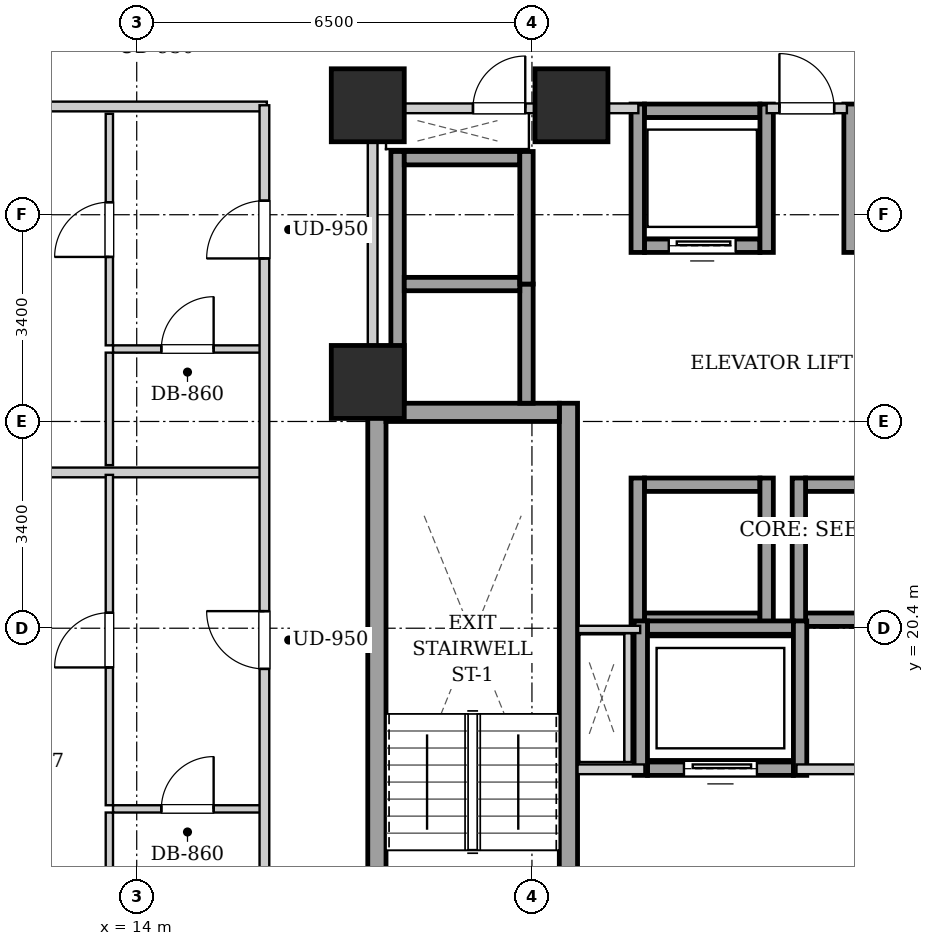
"""IFC4 building model, lengths in metres.
Left out: names, types, materials, properties, quantities, classifications, styles, units other than length and angle.
Written with IfcOpenShell. Run it as: python <this file> out.ifc"""

import sys

from ifc_helpers import new_model, si_unit, direction, frame, frame_2d, origin, origin_2d, place, context, subcontext, project, spatial, rectangle, extrude, element, fill, save


model = new_model("IFC4")
c1 = context("Model", 3, precision=1e-05, world=origin(), true_north=direction((0.0, 1.0)))
c2 = subcontext(c1, "Body", "Model", "MODEL_VIEW")
j1 = project(units=[si_unit("LENGTHUNIT", "METRE"), si_unit("PLANEANGLEUNIT", "RADIAN")], contexts=[c1])
p1 = place(None, origin())
s1 = spatial("IfcSite", under=j1, at=p1, CompositionType="ELEMENT")
p2 = place(p1, origin())
s2 = spatial("IfcBuilding", under=s1, at=p2, CompositionType="ELEMENT")
p3 = place(p2, frame((0.0, 0.0, 61.0)))
s3 = spatial("IfcBuildingStorey", under=s2, at=p3, CompositionType="ELEMENT", Elevation=61.0)
for number, where, z_axis, x_axis in (
    (1, (17.8, 29.0, 0.0), (0.0, 0.0, 1.0), (1.0, 0.0, 0.0)),
    (2, (21.15, 29.0, 0.0), (0.0, 0.0, 1.0), (1.0, 0.0, 0.0)),
    (3, (17.8, 24.45, 0.0), (0.0, 0.0, 1.0), (1.0, 0.0, 0.0)),
):
    element("IfcColumn", number, at=place(p3, frame(where, z_axis=z_axis, x_axis=x_axis)), inside=s3, PredefinedType="COLUMN", context=c2, shape_type="SweptSolid", body=[
        extrude(rectangle(XDim=1.2, YDim=1.2, at=origin_2d()), origin(), (0.0, 0.0, 1.0), 3.2),
    ])
for number, where, z_axis, x_axis in (
    (4, (17.95, 15.1, 0.0), (0.0, 0.0, 1.0), (0.0, 1.0, 0.0)),
    (5, (21.1, 15.1, 0.0), (0.0, 0.0, 1.0), (0.0, 1.0, 0.0)),
):
    element("IfcWall", number, at=place(p3, frame(where, z_axis=z_axis, x_axis=x_axis)), inside=s3, PredefinedType="SHEAR", context=c2, shape_type="SweptSolid", body=[
        extrude(rectangle(XDim=9.0, YDim=0.3, at=frame_2d((4.5, 0.0))), origin(), (0.0, 0.0, 1.0), 2.94),
    ])
p4 = place(p3, frame((18.1, 23.95, 0.0), z_axis=(0.0, 0.0, 1.0), x_axis=(1.0, 0.0, 0.0)))
e6 = element("IfcWall", 6, at=p4, inside=s3, PredefinedType="SHEAR", context=c2, shape_type="SweptSolid", body=[
    extrude(rectangle(XDim=2.85, YDim=0.3, at=frame_2d((1.425, 0.0))), origin(), (0.0, 0.0, 1.0), 2.94),
])
p5 = place(p3, frame((22.35, 26.69, 0.0), z_axis=(0.0, 0.0, 1.0), x_axis=(1.0, 0.0, 0.0)))
e7 = element("IfcWall", 7, at=p5, inside=s3, PredefinedType="SHEAR", context=c2, shape_type="SweptSolid", body=[
    extrude(rectangle(XDim=1.9, YDim=0.22, at=frame_2d((0.95, 0.0))), origin(), (0.0, 0.0, 1.0), 2.94),
])
p6 = place(p5, frame((0.4, 0.0, 0.0)))
e8 = element("IfcOpeningElement", 8, at=p6, cuts=e7, PredefinedType="OPENING", context=c2, shape_type="SweptSolid", body=[
    extrude(rectangle(XDim=1.1, YDim=2.15, at=frame_2d((0.55, 1.075))), frame((0.0, 0.12, 0.0), z_axis=(0.0, -1.0, 0.0), x_axis=(1.0, 0.0, 0.0)), (0.0, 0.0, 1.0), 0.24),
])
p7 = place(p3, frame((22.35, 28.91, 0.0), z_axis=(0.0, 0.0, 1.0), x_axis=(1.0, 0.0, 0.0)))
e9 = element("IfcWall", 9, at=p7, inside=s3, PredefinedType="SHEAR", context=c2, shape_type="SweptSolid", body=[
    extrude(rectangle(XDim=1.9, YDim=0.22, at=frame_2d((0.95, 0.0))), origin(), (0.0, 0.0, 1.0), 2.94),
])
for number, where, z_axis, x_axis in (
    (10, (22.24, 26.58, 0.0), (0.0, 0.0, 1.0), (0.0, 1.0, 0.0)),
    (11, (24.36, 26.58, 0.0), (0.0, 0.0, 1.0), (0.0, 1.0, 0.0)),
    (12, (25.74, 26.58, 0.0), (0.0, 0.0, 1.0), (0.0, 1.0, 0.0)),
):
    element("IfcWall", number, at=place(p3, frame(where, z_axis=z_axis, x_axis=x_axis)), inside=s3, PredefinedType="SHEAR", context=c2, shape_type="SweptSolid", body=[
        extrude(rectangle(XDim=2.44, YDim=0.22, at=frame_2d((1.22, 0.0))), origin(), (0.0, 0.0, 1.0), 2.94),
    ])
for number, where, z_axis, x_axis in (
    (13, (22.35, 20.54, 0.0), (0.0, 0.0, 1.0), (1.0, 0.0, 0.0)),
    (14, (22.35, 22.76, 0.0), (0.0, 0.0, 1.0), (1.0, 0.0, 0.0)),
):
    element("IfcWall", number, at=place(p3, frame(where, z_axis=z_axis, x_axis=x_axis)), inside=s3, PredefinedType="SHEAR", context=c2, shape_type="SweptSolid", body=[
        extrude(rectangle(XDim=1.9, YDim=0.22, at=frame_2d((0.95, 0.0))), origin(), (0.0, 0.0, 1.0), 2.94),
    ])
for number, where, z_axis, x_axis in (
    (15, (22.24, 20.43, 0.0), (0.0, 0.0, 1.0), (0.0, 1.0, 0.0)),
    (16, (24.36, 20.43, 0.0), (0.0, 0.0, 1.0), (0.0, 1.0, 0.0)),
):
    element("IfcWall", number, at=place(p3, frame(where, z_axis=z_axis, x_axis=x_axis)), inside=s3, PredefinedType="SHEAR", context=c2, shape_type="SweptSolid", body=[
        extrude(rectangle(XDim=2.44, YDim=0.22, at=frame_2d((1.22, 0.0))), origin(), (0.0, 0.0, 1.0), 2.94),
    ])
for number, where, z_axis, x_axis in (
    (17, (25.0, 20.54, 0.0), (0.0, 0.0, 1.0), (1.0, 0.0, 0.0)),
    (18, (25.0, 22.76, 0.0), (0.0, 0.0, 1.0), (1.0, 0.0, 0.0)),
):
    element("IfcWall", number, at=place(p3, frame(where, z_axis=z_axis, x_axis=x_axis)), inside=s3, PredefinedType="SHEAR", context=c2, shape_type="SweptSolid", body=[
        extrude(rectangle(XDim=1.9, YDim=0.22, at=frame_2d((0.95, 0.0))), origin(), (0.0, 0.0, 1.0), 2.94),
    ])
p8 = place(p3, frame((24.89, 20.43, 0.0), z_axis=(0.0, 0.0, 1.0), x_axis=(0.0, 1.0, 0.0)))
e19 = element("IfcWall", 19, at=p8, inside=s3, PredefinedType="SHEAR", context=c2, shape_type="SweptSolid", body=[
    extrude(rectangle(XDim=2.44, YDim=0.22, at=frame_2d((1.22, 0.0))), origin(), (0.0, 0.0, 1.0), 2.94),
])
p9 = place(p3, frame((18.29, 24.1, 0.0), z_axis=(0.0, 0.0, 1.0), x_axis=(0.0, 1.0, 0.0)))
e20 = element("IfcWall", 20, at=p9, inside=s3, PredefinedType="SHEAR", context=c2, shape_type="SweptSolid", body=[
    extrude(rectangle(XDim=4.14, YDim=0.22, at=frame_2d((2.07, 0.0))), origin(), (0.0, 0.0, 1.0), 2.94),
])
p10 = place(p3, frame((20.41, 24.1, 0.0), z_axis=(0.0, 0.0, 1.0), x_axis=(0.0, 1.0, 0.0)))
e21 = element("IfcWall", 21, at=p10, inside=s3, PredefinedType="SHEAR", context=c2, shape_type="SweptSolid", body=[
    extrude(rectangle(XDim=1.96, YDim=0.22, at=frame_2d((0.98, 0.0))), origin(), (0.0, 0.0, 1.0), 2.94),
])
for number, where, z_axis, x_axis in (
    (22, (18.4, 26.06, 0.0), (0.0, 0.0, 1.0), (1.0, 0.0, 0.0)),
    (23, (18.4, 28.13, 0.0), (0.0, 0.0, 1.0), (1.0, 0.0, 0.0)),
):
    element("IfcWall", number, at=place(p3, frame(where, z_axis=z_axis, x_axis=x_axis)), inside=s3, PredefinedType="SHEAR", context=c2, shape_type="SweptSolid", body=[
        extrude(rectangle(XDim=1.9, YDim=0.22, at=frame_2d((0.95, 0.0))), origin(), (0.0, 0.0, 1.0), 2.94),
    ])
p11 = place(p3, frame((20.41, 26.06, 0.0), z_axis=(0.0, 0.0, 1.0), x_axis=(0.0, 1.0, 0.0)))
e24 = element("IfcWall", 24, at=p11, inside=s3, PredefinedType="SHEAR", context=c2, shape_type="SweptSolid", body=[
    extrude(rectangle(XDim=2.18, YDim=0.22, at=frame_2d((1.09, 0.0))), origin(), (0.0, 0.0, 1.0), 2.94),
])
p12 = place(p3, frame((22.4, 18.09, 0.0), z_axis=(0.0, 0.0, 1.0), x_axis=(1.0, 0.0, 0.0)))
e25 = element("IfcWall", 25, at=p12, inside=s3, PredefinedType="SHEAR", context=c2, shape_type="SweptSolid", body=[
    extrude(rectangle(XDim=2.4, YDim=0.22, at=frame_2d((1.2, 0.0))), origin(), (0.0, 0.0, 1.0), 2.94),
])
p13 = place(p12, frame((0.6, 0.0, 0.0)))
e26 = element("IfcOpeningElement", 26, at=p13, cuts=e25, PredefinedType="OPENING", context=c2, shape_type="SweptSolid", body=[
    extrude(rectangle(XDim=1.2, YDim=2.15, at=frame_2d((0.6, 1.075))), frame((0.0, 0.12, 0.0), z_axis=(0.0, -1.0, 0.0), x_axis=(1.0, 0.0, 0.0)), (0.0, 0.0, 1.0), 0.24),
])
p14 = place(p3, frame((22.4, 20.41, 0.0), z_axis=(0.0, 0.0, 1.0), x_axis=(1.0, 0.0, 0.0)))
e27 = element("IfcWall", 27, at=p14, inside=s3, PredefinedType="SHEAR", context=c2, shape_type="SweptSolid", body=[
    extrude(rectangle(XDim=2.4, YDim=0.22, at=frame_2d((1.2, 0.0))), origin(), (0.0, 0.0, 1.0), 2.94),
])
for number, where, z_axis, x_axis in (
    (28, (22.29, 17.98, 0.0), (0.0, 0.0, 1.0), (0.0, 1.0, 0.0)),
    (29, (24.91, 17.98, 0.0), (0.0, 0.0, 1.0), (0.0, 1.0, 0.0)),
):
    element("IfcWall", number, at=place(p3, frame(where, z_axis=z_axis, x_axis=x_axis)), inside=s3, PredefinedType="SHEAR", context=c2, shape_type="SweptSolid", body=[
        extrude(rectangle(XDim=2.54, YDim=0.22, at=frame_2d((1.27, 0.0))), origin(), (0.0, 0.0, 1.0), 2.94),
    ])
p15 = place(p3, frame((21.25, 18.08, 0.0), z_axis=(0.0, 0.0, 1.0), x_axis=(1.0, 0.0, 0.0)))
e30 = element("IfcWall", 30, at=p15, inside=s3, PredefinedType="PARTITIONING", context=c2, shape_type="SweptSolid", body=[
    extrude(rectangle(XDim=1.1, YDim=0.16, at=frame_2d((0.55, 0.0))), origin(), (0.0, 0.0, 1.0), 2.94),
])
p16 = place(p3, frame((24.85, 18.08, 0.0), z_axis=(0.0, 0.0, 1.0), x_axis=(1.0, 0.0, 0.0)))
e31 = element("IfcWall", 31, at=p16, inside=s3, PredefinedType="PARTITIONING", context=c2, shape_type="SweptSolid", body=[
    extrude(rectangle(XDim=1.3, YDim=0.16, at=frame_2d((0.65, 0.0))), origin(), (0.0, 0.0, 1.0), 2.94),
])
p17 = place(p3, frame((17.88, 24.12, 0.0), z_axis=(0.0, 0.0, 1.0), x_axis=(0.0, 1.0, 0.0)))
e32 = element("IfcWall", 32, at=p17, inside=s3, PredefinedType="PARTITIONING", context=c2, shape_type="SweptSolid", body=[
    extrude(rectangle(XDim=4.76, YDim=0.16, at=frame_2d((2.38, 0.0))), origin(), (0.0, 0.0, 1.0), 2.94),
])
p18 = place(p3, frame((24.36, 28.95, 0.0), z_axis=(0.0, 0.0, 1.0), x_axis=(1.0, 0.0, 0.0)))
e33 = element("IfcWall", 33, at=p18, inside=s3, PredefinedType="PARTITIONING", context=c2, shape_type="SweptSolid", body=[
    extrude(rectangle(XDim=1.32, YDim=0.16, at=frame_2d((0.66, 0.0))), origin(), (0.0, 0.0, 1.0), 2.232),
])
p19 = place(p18, frame((0.21, 0.0, 0.0)))
e34 = element("IfcOpeningElement", 34, at=p19, cuts=e33, PredefinedType="OPENING", context=c2, shape_type="SweptSolid", body=[
    extrude(rectangle(XDim=0.9, YDim=2.05, at=frame_2d((0.45, 1.025))), frame((0.0, 0.09, 0.0), z_axis=(0.0, -1.0, 0.0), x_axis=(1.0, 0.0, 0.0)), (0.0, 0.0, 1.0), 0.18),
])
p20 = place(p3, frame((17.96, 28.95, 0.0), z_axis=(0.0, 0.0, 1.0), x_axis=(1.0, 0.0, 0.0)))
e35 = element("IfcWall", 35, at=p20, inside=s3, PredefinedType="PARTITIONING", context=c2, shape_type="SweptSolid", body=[
    extrude(rectangle(XDim=4.29, YDim=0.16, at=frame_2d((2.145, 0.0))), origin(), (0.0, 0.0, 1.0), 2.232),
])
p21 = place(p20, frame((1.57, 0.0, 0.0)))
e36 = element("IfcOpeningElement", 36, at=p21, cuts=e35, PredefinedType="OPENING", context=c2, shape_type="SweptSolid", body=[
    extrude(rectangle(XDim=0.86, YDim=2.05, at=frame_2d((0.43, 1.025))), frame((0.0, 0.09, 0.0), z_axis=(0.0, -1.0, 0.0), x_axis=(1.0, 0.0, 0.0)), (0.0, 0.0, 1.0), 0.18),
])
p22 = place(p3, frame((22.08, 18.2, 0.0), z_axis=(0.0, 0.0, 1.0), x_axis=(0.0, 1.0, 0.0)))
e37 = element("IfcWall", 37, at=p22, inside=s3, PredefinedType="PARTITIONING", context=c2, shape_type="SweptSolid", body=[
    extrude(rectangle(XDim=2.12, YDim=0.12, at=frame_2d((1.06, 0.0))), origin(), (0.0, 0.0, 1.0), 2.94),
])
p23 = place(p3, frame((22.28, 20.38, 0.0), z_axis=(0.0, 0.0, 1.0), x_axis=(-1.0, 0.0, 0.0)))
e38 = element("IfcWall", 38, at=p23, inside=s3, PredefinedType="PARTITIONING", context=c2, shape_type="SweptSolid", body=[
    extrude(rectangle(XDim=1.02, YDim=0.12, at=frame_2d((0.51, 0.0))), origin(), (0.0, 0.0, 1.0), 2.94),
])
p24 = place(p3, frame((7.78, 28.98, 0.0), z_axis=(0.0, 0.0, 1.0), x_axis=(1.0, 0.0, 0.0)))
e39 = element("IfcWall", 39, at=p24, inside=s3, PredefinedType="PARTITIONING", context=c2, shape_type="SweptSolid", body=[
    extrude(rectangle(XDim=8.36, YDim=0.16, at=frame_2d((4.18, 0.0))), origin(), (0.0, 0.0, 1.0), 2.232),
])
p25 = place(p3, frame((7.78, 22.962, 0.0), z_axis=(0.0, 0.0, 1.0), x_axis=(1.0, 0.0, 0.0)))
e40 = element("IfcWall", 40, at=p25, inside=s3, PredefinedType="PARTITIONING", context=c2, shape_type="SweptSolid", body=[
    extrude(rectangle(XDim=8.28, YDim=0.16, at=frame_2d((4.14, 0.0))), origin(), (0.0, 0.0, 1.0), 2.94),
])
p26 = place(p3, frame((13.61, 17.429, 0.0), z_axis=(0.0, 0.0, 1.0), x_axis=(1.0, 0.0, 0.0)))
e41 = element("IfcWall", 41, at=p26, inside=s3, PredefinedType="PARTITIONING", context=c2, shape_type="SweptSolid", body=[
    extrude(rectangle(XDim=2.45, YDim=0.12, at=frame_2d((1.225, 0.0))), origin(), (0.0, 0.0, 1.0), 2.94),
])
p27 = place(p26, frame((0.795, 0.0, 0.0)))
e42 = element("IfcOpeningElement", 42, at=p27, cuts=e41, PredefinedType="OPENING", context=c2, shape_type="SweptSolid", body=[
    extrude(rectangle(XDim=0.86, YDim=2.05, at=frame_2d((0.43, 1.025))), frame((0.0, 0.07, 0.0), z_axis=(0.0, -1.0, 0.0), x_axis=(1.0, 0.0, 0.0)), (0.0, 0.0, 1.0), 0.14),
])
p28 = place(p3, frame((13.55, 15.21, 0.0), z_axis=(0.0, 0.0, 1.0), x_axis=(0.0, 1.0, 0.0)))
e43 = element("IfcWall", 43, at=p28, inside=s3, PredefinedType="PARTITIONING", context=c2, shape_type="SweptSolid", body=[
    extrude(rectangle(XDim=2.159, YDim=0.12, at=frame_2d((1.08, 0.0))), origin(), (0.0, 0.0, 1.0), 2.94),
])
p29 = place(p3, frame((13.55, 17.489, 0.0), z_axis=(0.0, 0.0, 1.0), x_axis=(0.0, 1.0, 0.0)))
e44 = element("IfcWall", 44, at=p29, inside=s3, PredefinedType="PARTITIONING", context=c2, shape_type="SweptSolid", body=[
    extrude(rectangle(XDim=5.433, YDim=0.12, at=frame_2d((2.717, 0.0))), origin(), (0.0, 0.0, 1.0), 2.94),
])
p30 = place(p29, frame((2.266, 0.0, 0.0)))
e45 = element("IfcOpeningElement", 45, at=p30, cuts=e44, PredefinedType="OPENING", context=c2, shape_type="SweptSolid", body=[
    extrude(rectangle(XDim=0.9, YDim=2.05, at=frame_2d((0.45, 1.025))), frame((0.0, 0.07, 0.0), z_axis=(0.0, -1.0, 0.0), x_axis=(1.0, 0.0, 0.0)), (0.0, 0.0, 1.0), 0.14),
])
p31 = place(p3, frame((13.61, 24.992, 0.0), z_axis=(0.0, 0.0, 1.0), x_axis=(1.0, 0.0, 0.0)))
e46 = element("IfcWall", 46, at=p31, inside=s3, PredefinedType="PARTITIONING", context=c2, shape_type="SweptSolid", body=[
    extrude(rectangle(XDim=2.45, YDim=0.12, at=frame_2d((1.225, 0.0))), origin(), (0.0, 0.0, 1.0), 2.94),
])
p32 = place(p31, frame((0.795, 0.0, 0.0)))
e47 = element("IfcOpeningElement", 47, at=p32, cuts=e46, PredefinedType="OPENING", context=c2, shape_type="SweptSolid", body=[
    extrude(rectangle(XDim=0.86, YDim=2.05, at=frame_2d((0.43, 1.025))), frame((0.0, 0.07, 0.0), z_axis=(0.0, -1.0, 0.0), x_axis=(1.0, 0.0, 0.0)), (0.0, 0.0, 1.0), 0.14),
])
p33 = place(p3, frame((13.55, 23.082, 0.0), z_axis=(0.0, 0.0, 1.0), x_axis=(0.0, 1.0, 0.0)))
e48 = element("IfcWall", 48, at=p33, inside=s3, PredefinedType="PARTITIONING", context=c2, shape_type="SweptSolid", body=[
    extrude(rectangle(XDim=1.85, YDim=0.12, at=frame_2d((0.925, 0.0))), origin(), (0.0, 0.0, 1.0), 2.94),
])
p34 = place(p3, frame((13.55, 25.052, 0.0), z_axis=(0.0, 0.0, 1.0), x_axis=(0.0, 1.0, 0.0)))
e49 = element("IfcWall", 49, at=p34, inside=s3, PredefinedType="PARTITIONING", context=c2, shape_type="SweptSolid", body=[
    extrude(rectangle(XDim=3.808, YDim=0.12, at=frame_2d((1.904, 0.0))), origin(), (0.0, 0.0, 1.0), 2.94),
])
p35 = place(p34, frame((1.454, 0.0, 0.0)))
e50 = element("IfcOpeningElement", 50, at=p35, cuts=e49, PredefinedType="OPENING", context=c2, shape_type="SweptSolid", body=[
    extrude(rectangle(XDim=0.9, YDim=2.05, at=frame_2d((0.45, 1.025))), frame((0.0, 0.07, 0.0), z_axis=(0.0, -1.0, 0.0), x_axis=(1.0, 0.0, 0.0)), (0.0, 0.0, 1.0), 0.14),
])
p36 = place(p3, frame((16.1, 15.07, 0.0), z_axis=(0.0, 0.0, 1.0), x_axis=(0.0, 1.0, 0.0)))
e51 = element("IfcWall", 51, at=p36, inside=s3, PredefinedType="PARTITIONING", context=c2, shape_type="SweptSolid", body=[
    extrude(rectangle(XDim=13.93, YDim=0.16, at=frame_2d((6.965, 0.0))), origin(), (0.0, 0.0, 1.0), 2.94),
])
p37 = place(p36, frame((4.661, 0.0, 0.0)))
e52 = element("IfcOpeningElement", 52, at=p37, cuts=e51, PredefinedType="OPENING", context=c2, shape_type="SweptSolid", body=[
    extrude(rectangle(XDim=0.95, YDim=2.1, at=frame_2d((0.475, 1.05))), frame((0.0, 0.09, 0.0), z_axis=(0.0, -1.0, 0.0), x_axis=(1.0, 0.0, 0.0)), (0.0, 0.0, 1.0), 0.18),
])
p38 = place(p36, frame((11.411, 0.0, 0.0)))
e53 = element("IfcOpeningElement", 53, at=p38, cuts=e51, PredefinedType="OPENING", context=c2, shape_type="SweptSolid", body=[
    extrude(rectangle(XDim=0.95, YDim=2.1, at=frame_2d((0.475, 1.05))), frame((0.0, 0.09, 0.0), z_axis=(0.0, -1.0, 0.0), x_axis=(1.0, 0.0, 0.0)), (0.0, 0.0, 1.0), 0.18),
])
p39 = place(p6, origin())
e54 = element("IfcDoor", 54, at=p39, inside=s3, OperationType="SLIDING_TO_LEFT", PredefinedType="DOOR", context=c2, shape_type="SweptSolid", body=[
    extrude(rectangle(XDim=1.1, YDim=2.15, at=frame_2d((0.55, 1.075))), frame((0.0, 0.025, 0.0), z_axis=(0.0, -1.0, 0.0), x_axis=(1.0, 0.0, 0.0)), (0.0, 0.0, 1.0), 0.05),
])
fill(e8, e54)
p40 = place(p13, origin())
e55 = element("IfcDoor", 55, at=p40, inside=s3, OperationType="SLIDING_TO_LEFT", PredefinedType="DOOR", context=c2, shape_type="SweptSolid", body=[
    extrude(rectangle(XDim=1.2, YDim=2.15, at=frame_2d((0.6, 1.075))), frame((0.0, 0.025, 0.0), z_axis=(0.0, -1.0, 0.0), x_axis=(1.0, 0.0, 0.0)), (0.0, 0.0, 1.0), 0.05),
])
fill(e26, e55)
p41 = place(p19, origin())
e56 = element("IfcDoor", 56, at=p41, inside=s3, OperationType="SINGLE_SWING_LEFT", PredefinedType="DOOR", context=c2, shape_type="SweptSolid", body=[
    extrude(rectangle(XDim=0.9, YDim=2.05, at=frame_2d((0.45, 1.025))), frame((0.0, 0.025, 0.0), z_axis=(0.0, -1.0, 0.0), x_axis=(1.0, 0.0, 0.0)), (0.0, 0.0, 1.0), 0.05),
])
fill(e34, e56)
p42 = place(p21, origin())
e57 = element("IfcDoor", 57, at=p42, inside=s3, OperationType="SINGLE_SWING_RIGHT", PredefinedType="DOOR", context=c2, shape_type="SweptSolid", body=[
    extrude(rectangle(XDim=0.86, YDim=2.05, at=frame_2d((0.43, 1.025))), frame((0.0, 0.025, 0.0), z_axis=(0.0, -1.0, 0.0), x_axis=(1.0, 0.0, 0.0)), (0.0, 0.0, 1.0), 0.05),
])
fill(e36, e57)
p43 = place(p27, origin())
e58 = element("IfcDoor", 58, at=p43, inside=s3, OperationType="SINGLE_SWING_RIGHT", PredefinedType="DOOR", context=c2, shape_type="SweptSolid", body=[
    extrude(rectangle(XDim=0.86, YDim=2.05, at=frame_2d((0.43, 1.025))), frame((0.0, 0.025, 0.0), z_axis=(0.0, -1.0, 0.0), x_axis=(1.0, 0.0, 0.0)), (0.0, 0.0, 1.0), 0.05),
])
fill(e42, e58)
p44 = place(p30, origin())
e59 = element("IfcDoor", 59, at=p44, inside=s3, OperationType="SINGLE_SWING_LEFT", PredefinedType="DOOR", context=c2, shape_type="SweptSolid", body=[
    extrude(rectangle(XDim=0.9, YDim=2.05, at=frame_2d((0.45, 1.025))), frame((0.0, 0.025, 0.0), z_axis=(0.0, -1.0, 0.0), x_axis=(1.0, 0.0, 0.0)), (0.0, 0.0, 1.0), 0.05),
])
fill(e45, e59)
p45 = place(p32, origin())
e60 = element("IfcDoor", 60, at=p45, inside=s3, OperationType="SINGLE_SWING_RIGHT", PredefinedType="DOOR", context=c2, shape_type="SweptSolid", body=[
    extrude(rectangle(XDim=0.86, YDim=2.05, at=frame_2d((0.43, 1.025))), frame((0.0, 0.025, 0.0), z_axis=(0.0, -1.0, 0.0), x_axis=(1.0, 0.0, 0.0)), (0.0, 0.0, 1.0), 0.05),
])
fill(e47, e60)
p46 = place(p35, origin())
e61 = element("IfcDoor", 61, at=p46, inside=s3, OperationType="SINGLE_SWING_LEFT", PredefinedType="DOOR", context=c2, shape_type="SweptSolid", body=[
    extrude(rectangle(XDim=0.9, YDim=2.05, at=frame_2d((0.45, 1.025))), frame((0.0, 0.025, 0.0), z_axis=(0.0, -1.0, 0.0), x_axis=(1.0, 0.0, 0.0)), (0.0, 0.0, 1.0), 0.05),
])
fill(e50, e61)
p47 = place(p37, origin())
e62 = element("IfcDoor", 62, at=p47, inside=s3, OperationType="SINGLE_SWING_RIGHT", PredefinedType="DOOR", context=c2, shape_type="SweptSolid", body=[
    extrude(rectangle(XDim=0.95, YDim=2.1, at=frame_2d((0.475, 1.05))), frame((0.0, 0.025, 0.0), z_axis=(0.0, -1.0, 0.0), x_axis=(1.0, 0.0, 0.0)), (0.0, 0.0, 1.0), 0.05),
])
fill(e52, e62)
p48 = place(p38, origin())
e63 = element("IfcDoor", 63, at=p48, inside=s3, OperationType="SINGLE_SWING_LEFT", PredefinedType="DOOR", context=c2, shape_type="SweptSolid", body=[
    extrude(rectangle(XDim=0.95, YDim=2.1, at=frame_2d((0.475, 1.05))), frame((0.0, 0.025, 0.0), z_axis=(0.0, -1.0, 0.0), x_axis=(1.0, 0.0, 0.0)), (0.0, 0.0, 1.0), 0.05),
])
fill(e53, e63)
save(model, sys.argv[1])
